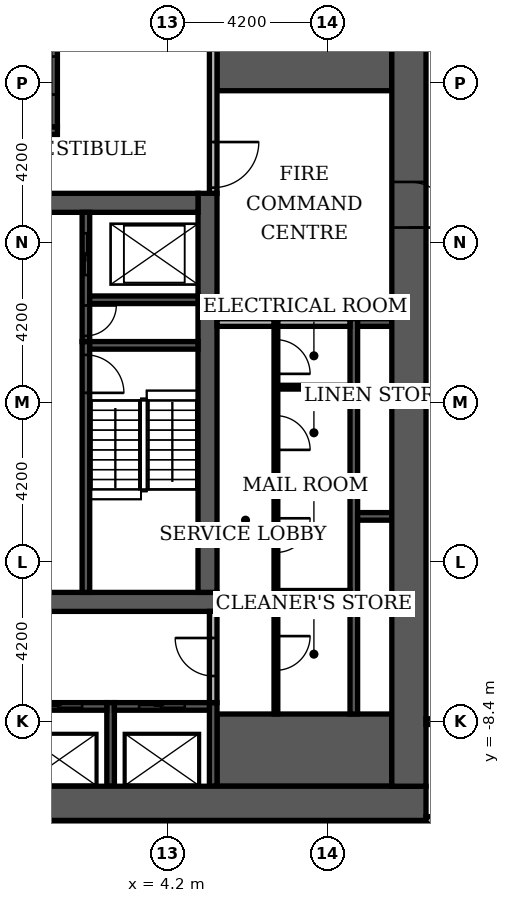
"""IFC4 building model, lengths in metres.
Left out: names, types, materials, properties, quantities, classifications, styles, units other than length and angle.
Written with IfcOpenShell. Run it as: python <this file> out.ifc"""

import sys

from ifc_helpers import new_model, si_unit, direction, frame, frame_2d, origin, place, context, subcontext, project, spatial, rectangle, extrude, element, fill, save


model = new_model("IFC4")
c1 = context("Model", 3, precision=1e-05, world=origin(), true_north=direction((0.0, 1.0)))
c2 = subcontext(c1, "Body", "Model", "MODEL_VIEW")
j1 = project(units=[si_unit("LENGTHUNIT", "METRE"), si_unit("PLANEANGLEUNIT", "RADIAN")], contexts=[c1])
p1 = place(None, origin())
s1 = spatial("IfcSite", under=j1, at=p1, CompositionType="ELEMENT")
p2 = place(p1, origin())
s2 = spatial("IfcBuilding", under=s1, at=p2, CompositionType="ELEMENT")
p3 = place(p2, origin())
s3 = spatial("IfcBuildingStorey", under=s2, at=p3, CompositionType="ELEMENT", Elevation=0.0)
p4 = place(p3, frame((-5.5, -5.25, 0.0), z_axis=(0.0, 0.0, 1.0), x_axis=(1.0, 0.0, 0.0)))
e1 = element("IfcWall", 1, at=p4, inside=s3, PredefinedType="SHEAR", context=c2, shape_type="SweptSolid", body=[
    extrude(rectangle(XDim=11.0, YDim=0.5, at=frame_2d((5.5, 0.0))), origin(), (0.0, 0.0, 1.0), 6.78),
])
p5 = place(p4, frame((4.9, 0.0, 0.0)))
e2 = element("IfcOpeningElement", 2, at=p5, cuts=e1, PredefinedType="OPENING", context=c2, shape_type="SweptSolid", body=[
    extrude(rectangle(XDim=1.2, YDim=2.1, at=frame_2d((0.6, 1.05))), frame((0.0, 0.26, 0.0), z_axis=(0.0, -1.0, 0.0), x_axis=(1.0, 0.0, 0.0)), (0.0, 0.0, 1.0), 0.52),
])
p6 = place(p3, frame((5.25, -5.0, 0.0), z_axis=(0.0, 0.0, 1.0), x_axis=(0.0, 1.0, 0.0)))
e3 = element("IfcWall", 3, at=p6, inside=s3, PredefinedType="SHEAR", context=c2, shape_type="SweptSolid", body=[
    extrude(rectangle(XDim=10.5, YDim=0.5, at=frame_2d((5.25, 0.0))), origin(), (0.0, 0.0, 1.0), 6.78),
])
p7 = place(p3, frame((-5.0, 5.25, 0.0), z_axis=(0.0, 0.0, 1.0), x_axis=(1.0, 0.0, 0.0)))
e4 = element("IfcWall", 4, at=p7, inside=s3, PredefinedType="SHEAR", context=c2, shape_type="SweptSolid", body=[
    extrude(rectangle(XDim=10.0, YDim=0.5, at=frame_2d((5.0, 0.0))), origin(), (0.0, 0.0, 1.0), 6.78),
])
p8 = place(p7, frame((4.4, 0.0, 0.0)))
e5 = element("IfcOpeningElement", 5, at=p8, cuts=e4, PredefinedType="OPENING", context=c2, shape_type="SweptSolid", body=[
    extrude(rectangle(XDim=1.2, YDim=2.1, at=frame_2d((0.6, 1.05))), frame((0.0, 0.26, 0.0), z_axis=(0.0, -1.0, 0.0), x_axis=(1.0, 0.0, 0.0)), (0.0, 0.0, 1.0), 0.52),
])
for number, where, z_axis, x_axis in (
    (6, (5.5, -9.15, 0.0), (0.0, 0.0, 1.0), (1.0, 0.0, 0.0)),
    (7, (5.5, 9.15, 0.0), (0.0, 0.0, 1.0), (1.0, 0.0, 0.0)),
):
    element("IfcWall", number, at=place(p3, frame(where, z_axis=z_axis, x_axis=x_axis)), inside=s3, PredefinedType="SHEAR", context=c2, shape_type="SweptSolid", body=[
        extrude(rectangle(XDim=4.6, YDim=1.9, at=frame_2d((2.3, 0.0))), origin(), (0.0, 0.0, 1.0), 6.78),
    ])
p9 = place(p3, frame((2.05, -5.0, 0.0), z_axis=(0.0, 0.0, 1.0), x_axis=(0.0, 1.0, 0.0)))
e8 = element("IfcWall", 8, at=p9, inside=s3, PredefinedType="SHEAR", context=c2, shape_type="SweptSolid", body=[
    extrude(rectangle(XDim=6.6, YDim=0.2, at=frame_2d((3.3, 0.0))), origin(), (0.0, 0.0, 1.0), 6.78),
])
p10 = place(p9, frame((5.25, 0.0, 0.0)))
e9 = element("IfcOpeningElement", 9, at=p10, cuts=e8, PredefinedType="OPENING", context=c2, shape_type="SweptSolid", body=[
    extrude(rectangle(XDim=1.0, YDim=2.1, at=frame_2d((0.5, 1.05))), frame((0.0, 0.11, 0.0), z_axis=(0.0, -1.0, 0.0), x_axis=(1.0, 0.0, 0.0)), (0.0, 0.0, 1.0), 0.22),
])
p11 = place(p3, frame((2.15, 1.5, 0.0), z_axis=(0.0, 0.0, 1.0), x_axis=(1.0, 0.0, 0.0)))
e10 = element("IfcWall", 10, at=p11, inside=s3, PredefinedType="SHEAR", context=c2, shape_type="SweptSolid", body=[
    extrude(rectangle(XDim=2.85, YDim=0.2, at=frame_2d((1.425, 0.0))), origin(), (0.0, 0.0, 1.0), 6.78),
])
p12 = place(p3, frame((-5.5, 7.15, 0.0), z_axis=(0.0, 0.0, 1.0), x_axis=(1.0, 0.0, 0.0)))
e11 = element("IfcWall", 11, at=p12, inside=s3, PredefinedType="SHEAR", context=c2, shape_type="SweptSolid", body=[
    extrude(rectangle(XDim=6.8, YDim=0.2, at=frame_2d((3.4, 0.0))), origin(), (0.0, 0.0, 1.0), 6.78),
])
p13 = place(p3, frame((1.2, 7.25, 0.0), z_axis=(0.0, 0.0, 1.0), x_axis=(0.0, 1.0, 0.0)))
e12 = element("IfcWall", 12, at=p13, inside=s3, PredefinedType="SHEAR", context=c2, shape_type="SweptSolid", body=[
    extrude(rectangle(XDim=2.85, YDim=0.2, at=frame_2d((1.425, 0.0))), origin(), (0.0, 0.0, 1.0), 6.78),
])
p14 = place(p13, frame((0.85, 0.0, 0.0)))
e13 = element("IfcOpeningElement", 13, at=p14, cuts=e12, PredefinedType="OPENING", context=c2, shape_type="SweptSolid", body=[
    extrude(rectangle(XDim=1.0, YDim=2.1, at=frame_2d((0.5, 1.05))), frame((0.0, 0.11, 0.0), z_axis=(0.0, -1.0, 0.0), x_axis=(1.0, 0.0, 0.0)), (0.0, 0.0, 1.0), 0.22),
])
for number, where, z_axis, x_axis in (
    (14, (2.7, -10.1, 0.0), (0.0, 0.0, 1.0), (0.0, 1.0, 0.0)),
    (15, (5.4, -10.1, 0.0), (0.0, 0.0, 1.0), (0.0, 1.0, 0.0)),
):
    element("IfcWall", number, at=place(p3, frame(where, z_axis=z_axis, x_axis=x_axis)), inside=s3, PredefinedType="SHEAR", context=c2, shape_type="SweptSolid", body=[
        extrude(rectangle(XDim=2.2, YDim=0.2, at=frame_2d((1.1, 0.0))), origin(), (0.0, 0.0, 1.0), 6.78),
    ])
p15 = place(p3, frame((9.1, -8.2, 0.0), z_axis=(0.0, 0.0, 1.0), x_axis=(0.0, 1.0, 0.0)))
e16 = element("IfcWall", 16, at=p15, inside=s3, PredefinedType="SHEAR", context=c2, shape_type="SweptSolid", body=[
    extrude(rectangle(XDim=10.4, YDim=0.2, at=frame_2d((5.2, 0.0))), origin(), (0.0, 0.0, 1.0), 6.78),
])
p16 = place(p3, frame((0.1, -8.0, 0.0), z_axis=(0.0, 0.0, 1.0), x_axis=(1.0, 0.0, 0.0)))
e17 = element("IfcWall", 17, at=p16, inside=s3, PredefinedType="SHEAR", context=c2, shape_type="SweptSolid", body=[
    extrude(rectangle(XDim=2.5, YDim=0.2, at=frame_2d((1.25, 0.0))), origin(), (0.0, 0.0, 1.0), 6.78),
])
p17 = place(p16, frame((0.65, 0.0, 0.0)))
e18 = element("IfcOpeningElement", 18, at=p17, cuts=e17, PredefinedType="OPENING", context=c2, shape_type="SweptSolid", body=[
    extrude(rectangle(XDim=1.2, YDim=2.1, at=frame_2d((0.6, 1.05))), frame((0.0, 0.11, 0.0), z_axis=(0.0, -1.0, 0.0), x_axis=(1.0, 0.0, 0.0)), (0.0, 0.0, 1.0), 0.22),
])
p18 = place(p3, frame((2.8, -8.0, 0.0), z_axis=(0.0, 0.0, 1.0), x_axis=(1.0, 0.0, 0.0)))
e19 = element("IfcWall", 19, at=p18, inside=s3, PredefinedType="SHEAR", context=c2, shape_type="SweptSolid", body=[
    extrude(rectangle(XDim=2.5, YDim=0.2, at=frame_2d((1.25, 0.0))), origin(), (0.0, 0.0, 1.0), 6.78),
])
p19 = place(p18, frame((0.65, 0.0, 0.0)))
e20 = element("IfcOpeningElement", 20, at=p19, cuts=e19, PredefinedType="OPENING", context=c2, shape_type="SweptSolid", body=[
    extrude(rectangle(XDim=1.2, YDim=2.1, at=frame_2d((0.6, 1.05))), frame((0.0, 0.11, 0.0), z_axis=(0.0, -1.0, 0.0), x_axis=(1.0, 0.0, 0.0)), (0.0, 0.0, 1.0), 0.22),
])
p20 = place(p3, frame((9.2, -3.0, 0.0), z_axis=(0.0, 0.0, 1.0), x_axis=(1.0, 0.0, 0.0)))
e21 = element("IfcWall", 21, at=p20, inside=s3, PredefinedType="SHEAR", context=c2, shape_type="SweptSolid", body=[
    extrude(rectangle(XDim=0.9, YDim=0.2, at=frame_2d((0.45, 0.0))), origin(), (0.0, 0.0, 1.0), 6.78),
])
p21 = place(p3, frame((2.05, 1.6, 0.0), z_axis=(0.0, 0.0, 1.0), x_axis=(0.0, 1.0, 0.0)))
e22 = element("IfcWall", 22, at=p21, inside=s3, PredefinedType="SHEAR", context=c2, shape_type="SweptSolid", body=[
    extrude(rectangle(XDim=3.4, YDim=0.2, at=frame_2d((1.7, 0.0))), origin(), (0.0, 0.0, 1.0), 6.78),
])
p22 = place(p21, frame((1.75, 0.0, 0.0)))
e23 = element("IfcOpeningElement", 23, at=p22, cuts=e22, PredefinedType="OPENING", context=c2, shape_type="SweptSolid", body=[
    extrude(rectangle(XDim=1.1, YDim=2.1, at=frame_2d((0.55, 1.05))), frame((0.0, 0.11, 0.0), z_axis=(0.0, -1.0, 0.0), x_axis=(1.0, 0.0, 0.0)), (0.0, 0.0, 1.0), 0.22),
])
p23 = place(p21, frame((0.15, 0.0, 0.0)))
e24 = element("IfcOpeningElement", 24, at=p23, cuts=e22, PredefinedType="OPENING", context=c2, shape_type="SweptSolid", body=[
    extrude(rectangle(XDim=0.8, YDim=2.1, at=frame_2d((0.4, 1.05))), frame((0.0, 0.11, 0.0), z_axis=(0.0, -1.0, 0.0), x_axis=(1.0, 0.0, 0.0)), (0.0, 0.0, 1.0), 0.22),
])
p24 = place(p3, frame((9.2, 2.1, 0.0), z_axis=(0.0, 0.0, 1.0), x_axis=(1.0, 0.0, 0.0)))
e25 = element("IfcWall", 25, at=p24, inside=s3, PredefinedType="SHEAR", context=c2, shape_type="SweptSolid", body=[
    extrude(rectangle(XDim=0.9, YDim=0.2, at=frame_2d((0.45, 0.0))), origin(), (0.0, 0.0, 1.0), 6.78),
])
p25 = place(p3, frame((2.15, 2.7, 0.0), z_axis=(0.0, 0.0, 1.0), x_axis=(1.0, 0.0, 0.0)))
e26 = element("IfcWall", 26, at=p25, inside=s3, PredefinedType="SHEAR", context=c2, shape_type="SweptSolid", body=[
    extrude(rectangle(XDim=2.85, YDim=0.2, at=frame_2d((1.425, 0.0))), origin(), (0.0, 0.0, 1.0), 6.78),
])
p26 = place(p3, frame((-11.0, -10.55, 0.0), z_axis=(0.0, 0.0, 1.0), x_axis=(1.0, 0.0, 0.0)))
e27 = element("IfcWall", 27, at=p26, inside=s3, PredefinedType="SHEAR", context=c2, shape_type="SweptSolid", body=[
    extrude(rectangle(XDim=22.0, YDim=0.9, at=frame_2d((11.0, 0.0))), origin(), (0.0, 0.0, 1.0), 6.78),
])
p27 = place(p26, frame((7.4, 0.0, 0.0)))
e28 = element("IfcOpeningElement", 28, at=p27, cuts=e27, PredefinedType="OPENING", context=c2, shape_type="SweptSolid", body=[
    extrude(rectangle(XDim=1.8, YDim=2.2, at=frame_2d((0.9, 1.1))), frame((0.0, 0.46, 0.0), z_axis=(0.0, -1.0, 0.0), x_axis=(1.0, 0.0, 0.0)), (0.0, 0.0, 1.0), 0.92),
])
p28 = place(p3, frame((10.55, -10.1, 0.0), z_axis=(0.0, 0.0, 1.0), x_axis=(0.0, 1.0, 0.0)))
e29 = element("IfcWall", 29, at=p28, inside=s3, PredefinedType="SHEAR", context=c2, shape_type="SweptSolid", body=[
    extrude(rectangle(XDim=20.2, YDim=0.9, at=frame_2d((10.1, 0.0))), origin(), (0.0, 0.0, 1.0), 6.78),
])
p29 = place(p28, frame((14.7, 0.0, 0.0)))
e30 = element("IfcOpeningElement", 30, at=p29, cuts=e29, PredefinedType="OPENING", context=c2, shape_type="SweptSolid", body=[
    extrude(rectangle(XDim=1.2, YDim=2.2, at=frame_2d((0.6, 1.1))), frame((0.0, 0.46, 0.0), z_axis=(0.0, -1.0, 0.0), x_axis=(1.0, 0.0, 0.0)), (0.0, 0.0, 1.0), 0.92),
])
p30 = place(p3, frame((7.05, -8.2, 0.0), z_axis=(0.0, 0.0, 1.0), x_axis=(0.0, 1.0, 0.0)))
e31 = element("IfcWall", 31, at=p30, inside=s3, PredefinedType="PARTITIONING", context=c2, shape_type="SweptSolid", body=[
    extrude(rectangle(XDim=10.4, YDim=0.1, at=frame_2d((5.2, 0.0))), origin(), (0.0, 0.0, 1.0), 6.78),
])
p31 = place(p30, frame((1.15, 0.0, 0.0)))
e32 = element("IfcOpeningElement", 32, at=p31, cuts=e31, PredefinedType="OPENING", context=c2, shape_type="SweptSolid", body=[
    extrude(rectangle(XDim=0.9, YDim=2.1, at=frame_2d((0.45, 1.05))), frame((0.0, 0.06, 0.0), z_axis=(0.0, -1.0, 0.0), x_axis=(1.0, 0.0, 0.0)), (0.0, 0.0, 1.0), 0.12),
])
p32 = place(p30, frame((4.25, 0.0, 0.0)))
e33 = element("IfcOpeningElement", 33, at=p32, cuts=e31, PredefinedType="OPENING", context=c2, shape_type="SweptSolid", body=[
    extrude(rectangle(XDim=0.9, YDim=2.1, at=frame_2d((0.45, 1.05))), frame((0.0, 0.06, 0.0), z_axis=(0.0, -1.0, 0.0), x_axis=(1.0, 0.0, 0.0)), (0.0, 0.0, 1.0), 0.12),
])
p33 = place(p30, frame((6.95, 0.0, 0.0)))
e34 = element("IfcOpeningElement", 34, at=p33, cuts=e31, PredefinedType="OPENING", context=c2, shape_type="SweptSolid", body=[
    extrude(rectangle(XDim=0.9, YDim=2.1, at=frame_2d((0.45, 1.05))), frame((0.0, 0.06, 0.0), z_axis=(0.0, -1.0, 0.0), x_axis=(1.0, 0.0, 0.0)), (0.0, 0.0, 1.0), 0.12),
])
p34 = place(p30, frame((8.95, 0.0, 0.0)))
e35 = element("IfcOpeningElement", 35, at=p34, cuts=e31, PredefinedType="OPENING", context=c2, shape_type="SweptSolid", body=[
    extrude(rectangle(XDim=0.9, YDim=2.1, at=frame_2d((0.45, 1.05))), frame((0.0, 0.06, 0.0), z_axis=(0.0, -1.0, 0.0), x_axis=(1.0, 0.0, 0.0)), (0.0, 0.0, 1.0), 0.12),
])
p35 = place(p3, frame((5.4, -7.9, 0.0), z_axis=(0.0, 0.0, 1.0), x_axis=(0.0, 1.0, 0.0)))
e36 = element("IfcWall", 36, at=p35, inside=s3, PredefinedType="PARTITIONING", context=c2, shape_type="SweptSolid", body=[
    extrude(rectangle(XDim=2.4, YDim=0.2, at=frame_2d((1.2, 0.0))), origin(), (0.0, 0.0, 1.0), 6.78),
])
p36 = place(p35, frame((0.7, 0.0, 0.0)))
e37 = element("IfcOpeningElement", 37, at=p36, cuts=e36, PredefinedType="OPENING", context=c2, shape_type="SweptSolid", body=[
    extrude(rectangle(XDim=1.0, YDim=2.1, at=frame_2d((0.5, 1.05))), frame((0.0, 0.11, 0.0), z_axis=(0.0, -1.0, 0.0), x_axis=(1.0, 0.0, 0.0)), (0.0, 0.0, 1.0), 0.22),
])
for number, where, z_axis, x_axis in (
    (38, (7.1, -5.0, 0.0), (0.0, 0.0, 1.0), (1.0, 0.0, 0.0)),
    (39, (7.1, -2.0, 0.0), (0.0, 0.0, 1.0), (1.0, 0.0, 0.0)),
    (40, (7.1, 0.4, 0.0), (0.0, 0.0, 1.0), (1.0, 0.0, 0.0)),
):
    element("IfcWall", number, at=place(p3, frame(where, z_axis=z_axis, x_axis=x_axis)), inside=s3, PredefinedType="PARTITIONING", context=c2, shape_type="SweptSolid", body=[
        extrude(rectangle(XDim=1.9, YDim=0.1, at=frame_2d((0.95, 0.0))), origin(), (0.0, 0.0, 1.0), 6.78),
    ])
p37 = place(p3, frame((5.5, 2.1, 0.0), z_axis=(0.0, 0.0, 1.0), x_axis=(1.0, 0.0, 0.0)))
e41 = element("IfcWall", 41, at=p37, inside=s3, PredefinedType="PARTITIONING", context=c2, shape_type="SweptSolid", body=[
    extrude(rectangle(XDim=1.5, YDim=0.2, at=frame_2d((0.75, 0.0))), origin(), (0.0, 0.0, 1.0), 6.78),
])
p38 = place(p3, frame((7.1, 2.1, 0.0), z_axis=(0.0, 0.0, 1.0), x_axis=(1.0, 0.0, 0.0)))
e42 = element("IfcWall", 42, at=p38, inside=s3, PredefinedType="PARTITIONING", context=c2, shape_type="SweptSolid", body=[
    extrude(rectangle(XDim=1.9, YDim=0.2, at=frame_2d((0.95, 0.0))), origin(), (0.0, 0.0, 1.0), 6.78),
])
p39 = place(p3, frame((5.4, 5.5, 0.0), z_axis=(0.0, 0.0, 1.0), x_axis=(0.0, 1.0, 0.0)))
e43 = element("IfcWall", 43, at=p39, inside=s3, PredefinedType="PARTITIONING", context=c2, shape_type="SweptSolid", body=[
    extrude(rectangle(XDim=4.6, YDim=0.2, at=frame_2d((2.3, 0.0))), origin(), (0.0, 0.0, 1.0), 6.78),
])
p40 = place(p39, frame((0.15, 0.0, 0.0)))
e44 = element("IfcOpeningElement", 44, at=p40, cuts=e43, PredefinedType="OPENING", context=c2, shape_type="SweptSolid", body=[
    extrude(rectangle(XDim=1.2, YDim=2.1, at=frame_2d((0.6, 1.05))), frame((0.0, 0.11, 0.0), z_axis=(0.0, -1.0, 0.0), x_axis=(1.0, 0.0, 0.0)), (0.0, 0.0, 1.0), 0.22),
])
p41 = place(p3, frame((11.0, -11.0, 0.0), z_axis=(0.0, 0.0, 1.0), x_axis=(1.0, 0.0, 0.0)))
e45 = element("IfcWall", 45, at=p41, inside=s3, PredefinedType="PARTITIONING", context=c2, shape_type="SweptSolid", body=[
    extrude(rectangle(XDim=14.1, YDim=0.2, at=frame_2d((7.05, 0.0))), origin(), (0.0, 0.0, 1.0), 6.78),
])
p42 = place(p41, frame((6.5, 0.0, 0.0)))
e46 = element("IfcOpeningElement", 46, at=p42, cuts=e45, PredefinedType="OPENING", context=c2, shape_type="SweptSolid", body=[
    extrude(rectangle(XDim=1.2, YDim=2.2, at=frame_2d((0.6, 1.1))), frame((0.0, 0.11, 0.0), z_axis=(0.0, -1.0, 0.0), x_axis=(1.0, 0.0, 0.0)), (0.0, 0.0, 1.0), 0.22),
])
p43 = place(p3, frame((11.0, -8.4, 0.0), z_axis=(0.0, 0.0, 1.0), x_axis=(1.0, 0.0, 0.0)))
e47 = element("IfcWall", 47, at=p43, inside=s3, PredefinedType="PARTITIONING", context=c2, shape_type="SweptSolid", body=[
    extrude(rectangle(XDim=13.6, YDim=0.15, at=frame_2d((6.8, 0.0))), origin(), (0.0, 0.0, 1.0), 6.78),
])
p44 = place(p43, frame((0.5, 0.0, 0.0)))
e48 = element("IfcOpeningElement", 48, at=p44, cuts=e47, PredefinedType="OPENING", context=c2, shape_type="SweptSolid", body=[
    extrude(rectangle(XDim=1.0, YDim=2.1, at=frame_2d((0.5, 1.05))), frame((0.0, 0.085, 0.0), z_axis=(0.0, -1.0, 0.0), x_axis=(1.0, 0.0, 0.0)), (0.0, 0.0, 1.0), 0.17),
])
p45 = place(p43, frame((3.7, 0.0, 0.0)))
e49 = element("IfcOpeningElement", 49, at=p45, cuts=e47, PredefinedType="OPENING", context=c2, shape_type="SweptSolid", body=[
    extrude(rectangle(XDim=1.0, YDim=2.1, at=frame_2d((0.5, 1.05))), frame((0.0, 0.085, 0.0), z_axis=(0.0, -1.0, 0.0), x_axis=(1.0, 0.0, 0.0)), (0.0, 0.0, 1.0), 0.17),
])
p46 = place(p43, frame((8.1, 0.0, 0.0)))
e50 = element("IfcOpeningElement", 50, at=p46, cuts=e47, PredefinedType="OPENING", context=c2, shape_type="SweptSolid", body=[
    extrude(rectangle(XDim=1.0, YDim=2.1, at=frame_2d((0.5, 1.05))), frame((0.0, 0.085, 0.0), z_axis=(0.0, -1.0, 0.0), x_axis=(1.0, 0.0, 0.0)), (0.0, 0.0, 1.0), 0.17),
])
p47 = place(p43, frame((11.3, 0.0, 0.0)))
e51 = element("IfcOpeningElement", 51, at=p47, cuts=e47, PredefinedType="OPENING", context=c2, shape_type="SweptSolid", body=[
    extrude(rectangle(XDim=1.0, YDim=2.1, at=frame_2d((0.5, 1.05))), frame((0.0, 0.085, 0.0), z_axis=(0.0, -1.0, 0.0), x_axis=(1.0, 0.0, 0.0)), (0.0, 0.0, 1.0), 0.17),
])
p48 = place(p3, frame((11.0, 0.0, 0.0), z_axis=(0.0, 0.0, 1.0), x_axis=(1.0, 0.0, 0.0)))
e52 = element("IfcWall", 52, at=p48, inside=s3, PredefinedType="PARTITIONING", context=c2, shape_type="SweptSolid", body=[
    extrude(rectangle(XDim=13.6, YDim=0.15, at=frame_2d((6.8, 0.0))), origin(), (0.0, 0.0, 1.0), 6.78),
])
p49 = place(p17, origin())
e53 = element("IfcDoor", 53, at=p49, inside=s3, OperationType="SLIDING_TO_LEFT", PredefinedType="DOOR", context=c2, shape_type="SweptSolid", body=[
    extrude(rectangle(XDim=1.2, YDim=2.1, at=frame_2d((0.6, 1.05))), frame((0.0, 0.025, 0.0), z_axis=(0.0, -1.0, 0.0), x_axis=(1.0, 0.0, 0.0)), (0.0, 0.0, 1.0), 0.05),
])
fill(e18, e53)
p50 = place(p19, origin())
e54 = element("IfcDoor", 54, at=p50, inside=s3, OperationType="SLIDING_TO_LEFT", PredefinedType="DOOR", context=c2, shape_type="SweptSolid", body=[
    extrude(rectangle(XDim=1.2, YDim=2.1, at=frame_2d((0.6, 1.05))), frame((0.0, 0.025, 0.0), z_axis=(0.0, -1.0, 0.0), x_axis=(1.0, 0.0, 0.0)), (0.0, 0.0, 1.0), 0.05),
])
fill(e20, e54)
p51 = place(p22, origin())
e55 = element("IfcDoor", 55, at=p51, inside=s3, OperationType="SLIDING_TO_LEFT", PredefinedType="DOOR", context=c2, shape_type="SweptSolid", body=[
    extrude(rectangle(XDim=1.1, YDim=2.1, at=frame_2d((0.55, 1.05))), frame((0.0, 0.025, 0.0), z_axis=(0.0, -1.0, 0.0), x_axis=(1.0, 0.0, 0.0)), (0.0, 0.0, 1.0), 0.05),
])
fill(e23, e55)
p52 = place(p10, frame((1.0, 0.0, 0.0), z_axis=(0.0, 0.0, 1.0), x_axis=(-1.0, 0.0, 0.0)))
e56 = element("IfcDoor", 56, at=p52, inside=s3, OperationType="SINGLE_SWING_LEFT", PredefinedType="DOOR", context=c2, shape_type="SweptSolid", body=[
    extrude(rectangle(XDim=1.0, YDim=2.1, at=frame_2d((0.5, 1.05))), frame((0.0, 0.025, 0.0), z_axis=(0.0, -1.0, 0.0), x_axis=(1.0, 0.0, 0.0)), (0.0, 0.0, 1.0), 0.05),
])
fill(e9, e56)
p53 = place(p23, frame((0.8, 0.0, 0.0), z_axis=(0.0, 0.0, 1.0), x_axis=(-1.0, 0.0, 0.0)))
e57 = element("IfcDoor", 57, at=p53, inside=s3, OperationType="SINGLE_SWING_RIGHT", PredefinedType="DOOR", context=c2, shape_type="SweptSolid", body=[
    extrude(rectangle(XDim=0.8, YDim=2.1, at=frame_2d((0.4, 1.05))), frame((0.0, 0.025, 0.0), z_axis=(0.0, -1.0, 0.0), x_axis=(1.0, 0.0, 0.0)), (0.0, 0.0, 1.0), 0.05),
])
fill(e24, e57)
p54 = place(p14, origin())
e58 = element("IfcDoor", 58, at=p54, inside=s3, OperationType="SINGLE_SWING_LEFT", PredefinedType="DOOR", context=c2, shape_type="SweptSolid", body=[
    extrude(rectangle(XDim=1.0, YDim=2.1, at=frame_2d((0.5, 1.05))), frame((0.0, 0.025, 0.0), z_axis=(0.0, -1.0, 0.0), x_axis=(1.0, 0.0, 0.0)), (0.0, 0.0, 1.0), 0.05),
])
fill(e13, e58)
p55 = place(p36, origin())
e59 = element("IfcDoor", 59, at=p55, inside=s3, OperationType="SINGLE_SWING_RIGHT", PredefinedType="DOOR", context=c2, shape_type="SweptSolid", body=[
    extrude(rectangle(XDim=1.0, YDim=2.1, at=frame_2d((0.5, 1.05))), frame((0.0, 0.025, 0.0), z_axis=(0.0, -1.0, 0.0), x_axis=(1.0, 0.0, 0.0)), (0.0, 0.0, 1.0), 0.05),
])
fill(e37, e59)
p56 = place(p40, frame((1.2, 0.0, 0.0), z_axis=(0.0, 0.0, 1.0), x_axis=(-1.0, 0.0, 0.0)))
e60 = element("IfcDoor", 60, at=p56, inside=s3, OperationType="SINGLE_SWING_RIGHT", PredefinedType="DOOR", context=c2, shape_type="SweptSolid", body=[
    extrude(rectangle(XDim=1.2, YDim=2.1, at=frame_2d((0.6, 1.05))), frame((0.0, 0.025, 0.0), z_axis=(0.0, -1.0, 0.0), x_axis=(1.0, 0.0, 0.0)), (0.0, 0.0, 1.0), 0.05),
])
fill(e44, e60)
p57 = place(p29, frame((1.2, 0.0, 0.0), z_axis=(0.0, 0.0, 1.0), x_axis=(-1.0, 0.0, 0.0)))
e61 = element("IfcDoor", 61, at=p57, inside=s3, OperationType="SINGLE_SWING_LEFT", PredefinedType="DOOR", context=c2, shape_type="SweptSolid", body=[
    extrude(rectangle(XDim=1.2, YDim=2.2, at=frame_2d((0.6, 1.1))), frame((0.0, 0.025, 0.0), z_axis=(0.0, -1.0, 0.0), x_axis=(1.0, 0.0, 0.0)), (0.0, 0.0, 1.0), 0.05),
])
fill(e30, e61)
p58 = place(p31, frame((0.9, 0.0, 0.0), z_axis=(0.0, 0.0, 1.0), x_axis=(-1.0, 0.0, 0.0)))
e62 = element("IfcDoor", 62, at=p58, inside=s3, OperationType="SINGLE_SWING_RIGHT", PredefinedType="DOOR", context=c2, shape_type="SweptSolid", body=[
    extrude(rectangle(XDim=0.9, YDim=2.1, at=frame_2d((0.45, 1.05))), frame((0.0, 0.025, 0.0), z_axis=(0.0, -1.0, 0.0), x_axis=(1.0, 0.0, 0.0)), (0.0, 0.0, 1.0), 0.05),
])
fill(e32, e62)
p59 = place(p32, frame((0.9, 0.0, 0.0), z_axis=(0.0, 0.0, 1.0), x_axis=(-1.0, 0.0, 0.0)))
e63 = element("IfcDoor", 63, at=p59, inside=s3, OperationType="SINGLE_SWING_RIGHT", PredefinedType="DOOR", context=c2, shape_type="SweptSolid", body=[
    extrude(rectangle(XDim=0.9, YDim=2.1, at=frame_2d((0.45, 1.05))), frame((0.0, 0.025, 0.0), z_axis=(0.0, -1.0, 0.0), x_axis=(1.0, 0.0, 0.0)), (0.0, 0.0, 1.0), 0.05),
])
fill(e33, e63)
p60 = place(p33, frame((0.9, 0.0, 0.0), z_axis=(0.0, 0.0, 1.0), x_axis=(-1.0, 0.0, 0.0)))
e64 = element("IfcDoor", 64, at=p60, inside=s3, OperationType="SINGLE_SWING_LEFT", PredefinedType="DOOR", context=c2, shape_type="SweptSolid", body=[
    extrude(rectangle(XDim=0.9, YDim=2.1, at=frame_2d((0.45, 1.05))), frame((0.0, 0.025, 0.0), z_axis=(0.0, -1.0, 0.0), x_axis=(1.0, 0.0, 0.0)), (0.0, 0.0, 1.0), 0.05),
])
fill(e34, e64)
p61 = place(p34, frame((0.9, 0.0, 0.0), z_axis=(0.0, 0.0, 1.0), x_axis=(-1.0, 0.0, 0.0)))
e65 = element("IfcDoor", 65, at=p61, inside=s3, OperationType="SINGLE_SWING_LEFT", PredefinedType="DOOR", context=c2, shape_type="SweptSolid", body=[
    extrude(rectangle(XDim=0.9, YDim=2.1, at=frame_2d((0.45, 1.05))), frame((0.0, 0.025, 0.0), z_axis=(0.0, -1.0, 0.0), x_axis=(1.0, 0.0, 0.0)), (0.0, 0.0, 1.0), 0.05),
])
fill(e35, e65)
save(model, sys.argv[1])
